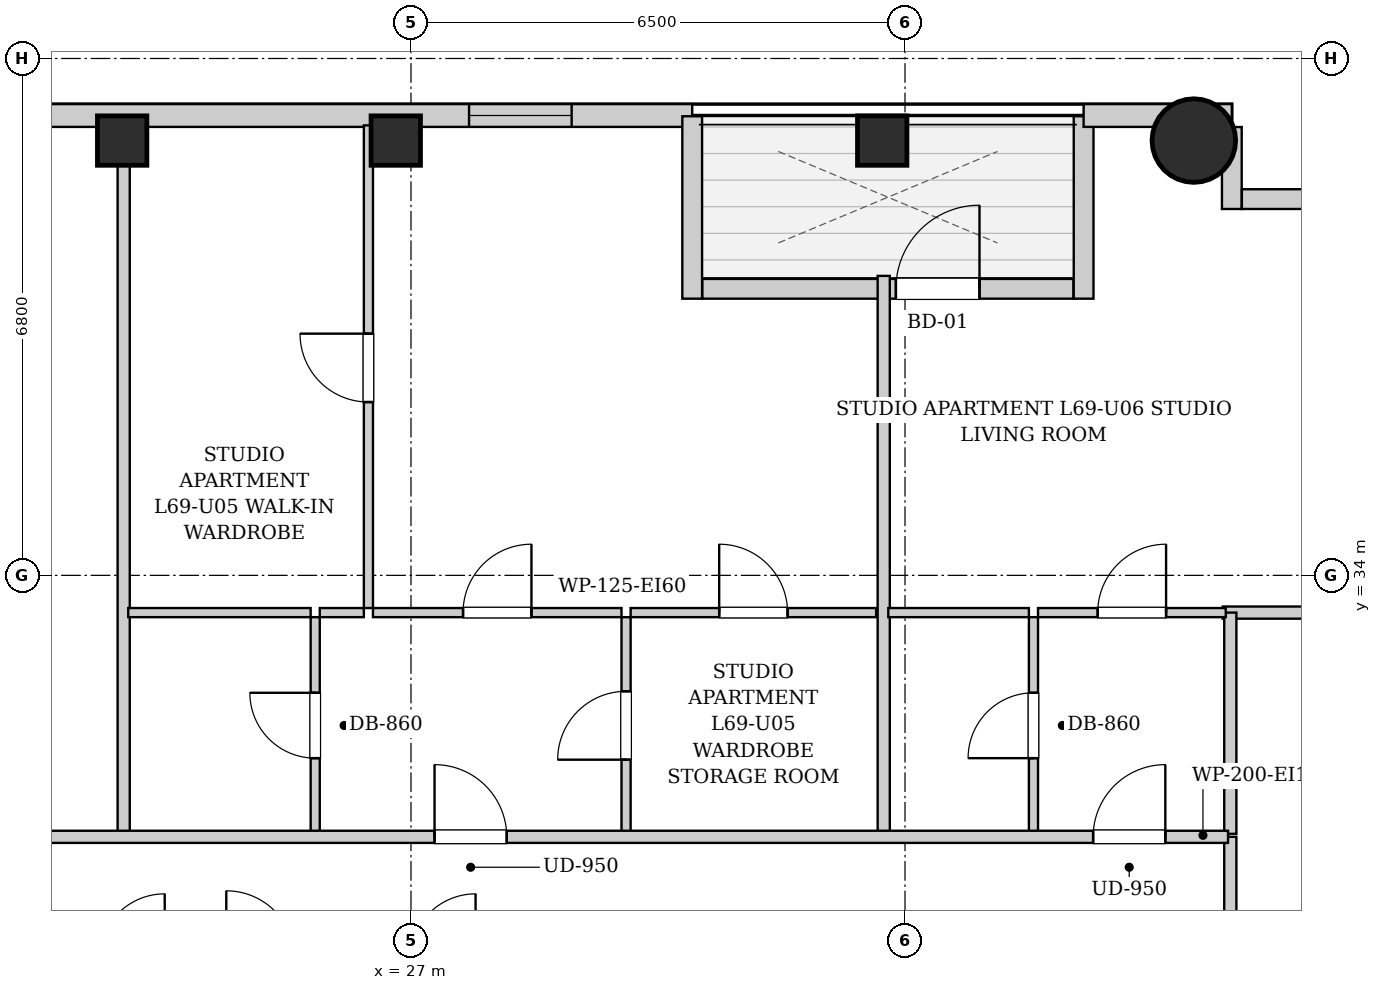
"""IFC4 building model, lengths in metres.
Left out: names, types, materials, properties, quantities, classifications, styles, units other than length and angle.
Written with IfcOpenShell. Run it as: python <this file> out.ifc"""

import sys

from ifc_helpers import new_model, si_unit, direction, frame, frame_2d, origin, origin_2d, place, context, subcontext, project, spatial, rectangle, circle, extrude, element, fill, save


model = new_model("IFC4")
c1 = context("Model", 3, precision=1e-05, world=origin(), true_north=direction((0.0, 1.0)))
c2 = subcontext(c1, "Body", "Model", "MODEL_VIEW")
j1 = project(units=[si_unit("LENGTHUNIT", "METRE"), si_unit("PLANEANGLEUNIT", "RADIAN")], contexts=[c1])
p1 = place(None, origin())
s1 = spatial("IfcSite", under=j1, at=p1, CompositionType="ELEMENT")
p2 = place(p1, origin())
s2 = spatial("IfcBuilding", under=s1, at=p2, CompositionType="ELEMENT")
p3 = place(p2, frame((0.0, 0.0, 237.7)))
s3 = spatial("IfcBuildingStorey", under=s2, at=p3, CompositionType="ELEMENT", Elevation=237.7)
for number, where, z_axis, x_axis in (
    (1, (23.2, 39.72, 0.0), (0.0, 0.0, 1.0), (1.0, 0.0, 0.0)),
    (2, (26.8, 39.72, 0.0), (0.0, 0.0, 1.0), (1.0, 0.0, 0.0)),
    (3, (33.2, 39.72, 0.0), (0.0, 0.0, 1.0), (1.0, 0.0, 0.0)),
):
    element("IfcColumn", number, at=place(p3, frame(where, z_axis=z_axis, x_axis=x_axis)), inside=s3, PredefinedType="COLUMN", context=c2, shape_type="SweptSolid", body=[
        extrude(rectangle(XDim=0.65, YDim=0.65, at=origin_2d()), origin(), (0.0, 0.0, 1.0), 3.4),
    ])
p4 = place(p3, frame((37.3, 39.72, 0.0), z_axis=(0.0, 0.0, 1.0), x_axis=(1.0, 0.0, 0.0)))
e4 = element("IfcColumn", 4, at=p4, inside=s3, PredefinedType="COLUMN", context=c2, shape_type="SweptSolid", body=[
    extrude(circle(Radius=0.55, at=origin_2d()), origin(), (0.0, 0.0, 1.0), 3.4),
])
p5 = place(p3, frame((19.7, 40.05, 0.0), z_axis=(0.0, 0.0, 1.0), x_axis=(1.0, 0.0, 0.0)))
e5 = element("IfcWall", 5, at=p5, inside=s3, PredefinedType="SOLIDWALL", context=c2, shape_type="SweptSolid", body=[
    extrude(rectangle(XDim=11.0, YDim=0.3, at=frame_2d((5.5, 0.0))), origin(), (0.0, 0.0, 1.0), 3.14),
])
p6 = place(p5, frame((8.064, 0.0, 0.55)))
e6 = element("IfcOpeningElement", 6, at=p6, cuts=e5, PredefinedType="OPENING", context=c2, shape_type="SweptSolid", body=[
    extrude(rectangle(XDim=1.35, YDim=1.2, at=frame_2d((0.675, 0.6))), frame((0.0, 0.16, 0.0), z_axis=(0.0, -1.0, 0.0), x_axis=(1.0, 0.0, 0.0)), (0.0, 0.0, 1.0), 0.32),
])
p7 = place(p3, frame((30.7, 40.04, 0.0), z_axis=(0.0, 0.0, 1.0), x_axis=(0.0, -1.0, 0.0)))
e7 = element("IfcWall", 7, at=p7, inside=s3, PredefinedType="SOLIDWALL", context=c2, shape_type="SweptSolid", body=[
    extrude(rectangle(XDim=2.4, YDim=0.26, at=frame_2d((1.2, 0.0))), origin(), (0.0, 0.0, 1.0), 3.14),
])
p8 = place(p3, frame((30.834, 37.77, 0.0), z_axis=(0.0, 0.0, 1.0), x_axis=(1.0, 0.0, 0.0)))
e8 = element("IfcWall", 8, at=p8, inside=s3, PredefinedType="SOLIDWALL", context=c2, shape_type="SweptSolid", body=[
    extrude(rectangle(XDim=4.882, YDim=0.26, at=frame_2d((2.441, 0.0))), origin(), (0.0, 0.0, 1.0), 3.14),
])
p9 = place(p8, frame((2.546, 0.0, 0.0)))
e9 = element("IfcOpeningElement", 9, at=p9, cuts=e8, PredefinedType="OPENING", context=c2, shape_type="SweptSolid", body=[
    extrude(rectangle(XDim=1.1, YDim=2.0, at=frame_2d((0.55, 1.0))), frame((0.0, 0.14, 0.0), z_axis=(0.0, -1.0, 0.0), x_axis=(1.0, 0.0, 0.0)), (0.0, 0.0, 1.0), 0.28),
])
p10 = place(p3, frame((35.85, 37.64, 0.0), z_axis=(0.0, 0.0, 1.0), x_axis=(0.0, 1.0, 0.0)))
e10 = element("IfcWall", 10, at=p10, inside=s3, PredefinedType="SOLIDWALL", context=c2, shape_type="SweptSolid", body=[
    extrude(rectangle(XDim=2.4, YDim=0.26, at=frame_2d((1.2, 0.0))), origin(), (0.0, 0.0, 1.0), 3.14),
])
p11 = place(p3, frame((35.85, 40.05, 0.0), z_axis=(0.0, 0.0, 1.0), x_axis=(1.0, 0.0, 0.0)))
e11 = element("IfcWall", 11, at=p11, inside=s3, PredefinedType="SOLIDWALL", context=c2, shape_type="SweptSolid", body=[
    extrude(rectangle(XDim=1.95, YDim=0.3, at=frame_2d((0.975, 0.0))), origin(), (0.0, 0.0, 1.0), 3.14),
])
p12 = place(p3, frame((37.8, 39.898, 0.0), z_axis=(0.0, 0.0, 1.0), x_axis=(0.0, -1.0, 0.0)))
e12 = element("IfcWall", 12, at=p12, inside=s3, PredefinedType="SOLIDWALL", context=c2, shape_type="SweptSolid", body=[
    extrude(rectangle(XDim=1.078, YDim=0.26, at=frame_2d((0.539, 0.0))), origin(), (0.0, 0.0, 1.0), 3.14),
])
p13 = place(p3, frame((37.932, 38.95, 0.0), z_axis=(0.0, 0.0, 1.0), x_axis=(1.0, 0.0, 0.0)))
e13 = element("IfcWall", 13, at=p13, inside=s3, PredefinedType="SOLIDWALL", context=c2, shape_type="SweptSolid", body=[
    extrude(rectangle(XDim=1.248, YDim=0.26, at=frame_2d((0.624, 0.0))), origin(), (0.0, 0.0, 1.0), 3.14),
])
p14 = place(p3, frame((37.78, 28.98, 0.0), z_axis=(0.0, 0.0, 1.0), x_axis=(0.0, 1.0, 0.0)))
e14 = element("IfcWall", 14, at=p14, inside=s3, PredefinedType="PARTITIONING", context=c2, shape_type="SweptSolid", body=[
    extrude(rectangle(XDim=1.58, YDim=0.16, at=frame_2d((0.79, 0.0))), origin(), (0.0, 0.0, 1.0), 3.14),
])
p15 = place(p3, frame((23.22, 30.6, 0.0), z_axis=(0.0, 0.0, 1.0), x_axis=(0.0, 1.0, 0.0)))
e15 = element("IfcWall", 15, at=p15, inside=s3, PredefinedType="PARTITIONING", context=c2, shape_type="SweptSolid", body=[
    extrude(rectangle(XDim=9.32, YDim=0.16, at=frame_2d((4.66, 0.0))), origin(), (0.0, 0.0, 1.0), 3.14),
])
p16 = place(p3, frame((25.74, 30.6, 0.0), z_axis=(0.0, 0.0, 1.0), x_axis=(0.0, 1.0, 0.0)))
e16 = element("IfcWall", 16, at=p16, inside=s3, PredefinedType="PARTITIONING", context=c2, shape_type="SweptSolid", body=[
    extrude(rectangle(XDim=2.85, YDim=0.12, at=frame_2d((1.425, 0.0))), origin(), (0.0, 0.0, 1.0), 3.14),
])
p17 = place(p16, frame((0.995, 0.0, 0.0)))
e17 = element("IfcOpeningElement", 17, at=p17, cuts=e16, PredefinedType="OPENING", context=c2, shape_type="SweptSolid", body=[
    extrude(rectangle(XDim=0.86, YDim=2.05, at=frame_2d((0.43, 1.025))), frame((0.0, 0.07, 0.0), z_axis=(0.0, -1.0, 0.0), x_axis=(1.0, 0.0, 0.0)), (0.0, 0.0, 1.0), 0.14),
])
p18 = place(p3, frame((23.28, 33.51, 0.0), z_axis=(0.0, 0.0, 1.0), x_axis=(1.0, 0.0, 0.0)))
e18 = element("IfcWall", 18, at=p18, inside=s3, PredefinedType="PARTITIONING", context=c2, shape_type="SweptSolid", body=[
    extrude(rectangle(XDim=2.4, YDim=0.12, at=frame_2d((1.2, 0.0))), origin(), (0.0, 0.0, 1.0), 3.14),
])
p19 = place(p3, frame((29.83, 30.6, 0.0), z_axis=(0.0, 0.0, 1.0), x_axis=(0.0, 1.0, 0.0)))
e19 = element("IfcWall", 19, at=p19, inside=s3, PredefinedType="PARTITIONING", context=c2, shape_type="SweptSolid", body=[
    extrude(rectangle(XDim=2.85, YDim=0.12, at=frame_2d((1.425, 0.0))), origin(), (0.0, 0.0, 1.0), 3.14),
])
p20 = place(p19, frame((0.975, 0.0, 0.0)))
e20 = element("IfcOpeningElement", 20, at=p20, cuts=e19, PredefinedType="OPENING", context=c2, shape_type="SweptSolid", body=[
    extrude(rectangle(XDim=0.9, YDim=2.05, at=frame_2d((0.45, 1.025))), frame((0.0, 0.07, 0.0), z_axis=(0.0, -1.0, 0.0), x_axis=(1.0, 0.0, 0.0)), (0.0, 0.0, 1.0), 0.14),
])
p21 = place(p3, frame((25.8, 33.51, 0.0), z_axis=(0.0, 0.0, 1.0), x_axis=(1.0, 0.0, 0.0)))
e21 = element("IfcWall", 21, at=p21, inside=s3, PredefinedType="PARTITIONING", context=c2, shape_type="SweptSolid", body=[
    extrude(rectangle(XDim=0.58, YDim=0.12, at=frame_2d((0.29, 0.0))), origin(), (0.0, 0.0, 1.0), 3.14),
])
p22 = place(p3, frame((26.5, 33.51, 0.0), z_axis=(0.0, 0.0, 1.0), x_axis=(1.0, 0.0, 0.0)))
e22 = element("IfcWall", 22, at=p22, inside=s3, PredefinedType="PARTITIONING", context=c2, shape_type="SweptSolid", body=[
    extrude(rectangle(XDim=3.27, YDim=0.12, at=frame_2d((1.635, 0.0))), origin(), (0.0, 0.0, 1.0), 3.14),
])
p23 = place(p22, frame((1.185, 0.0, 0.0)))
e23 = element("IfcOpeningElement", 23, at=p23, cuts=e22, PredefinedType="OPENING", context=c2, shape_type="SweptSolid", body=[
    extrude(rectangle(XDim=0.9, YDim=2.05, at=frame_2d((0.45, 1.025))), frame((0.0, 0.07, 0.0), z_axis=(0.0, -1.0, 0.0), x_axis=(1.0, 0.0, 0.0)), (0.0, 0.0, 1.0), 0.14),
])
p24 = place(p3, frame((29.89, 33.51, 0.0), z_axis=(0.0, 0.0, 1.0), x_axis=(1.0, 0.0, 0.0)))
e24 = element("IfcWall", 24, at=p24, inside=s3, PredefinedType="PARTITIONING", context=c2, shape_type="SweptSolid", body=[
    extrude(rectangle(XDim=3.23, YDim=0.12, at=frame_2d((1.615, 0.0))), origin(), (0.0, 0.0, 1.0), 3.14),
])
p25 = place(p24, frame((1.165, 0.0, 0.0)))
e25 = element("IfcOpeningElement", 25, at=p25, cuts=e24, PredefinedType="OPENING", context=c2, shape_type="SweptSolid", body=[
    extrude(rectangle(XDim=0.9, YDim=2.05, at=frame_2d((0.45, 1.025))), frame((0.0, 0.07, 0.0), z_axis=(0.0, -1.0, 0.0), x_axis=(1.0, 0.0, 0.0)), (0.0, 0.0, 1.0), 0.14),
])
p26 = place(p3, frame((26.44, 33.57, 0.0), z_axis=(0.0, 0.0, 1.0), x_axis=(0.0, 1.0, 0.0)))
e26 = element("IfcWall", 26, at=p26, inside=s3, PredefinedType="PARTITIONING", context=c2, shape_type="SweptSolid", body=[
    extrude(rectangle(XDim=6.35, YDim=0.12, at=frame_2d((3.175, 0.0))), origin(), (0.0, 0.0, 1.0), 3.14),
])
p27 = place(p26, frame((2.71, 0.0, 0.0)))
e27 = element("IfcOpeningElement", 27, at=p27, cuts=e26, PredefinedType="OPENING", context=c2, shape_type="SweptSolid", body=[
    extrude(rectangle(XDim=0.9, YDim=2.05, at=frame_2d((0.45, 1.025))), frame((0.0, 0.07, 0.0), z_axis=(0.0, -1.0, 0.0), x_axis=(1.0, 0.0, 0.0)), (0.0, 0.0, 1.0), 0.14),
])
p28 = place(p3, frame((37.68, 33.51, 0.0), z_axis=(0.0, 0.0, 1.0), x_axis=(1.0, 0.0, 0.0)))
e28 = element("IfcWall", 28, at=p28, inside=s3, PredefinedType="PARTITIONING", context=c2, shape_type="SweptSolid", body=[
    extrude(rectangle(XDim=2.34, YDim=0.16, at=frame_2d((1.17, 0.0))), origin(), (0.0, 0.0, 1.0), 3.14),
])
p29 = place(p3, frame((37.78, 30.6, 0.0), z_axis=(0.0, 0.0, 1.0), x_axis=(0.0, 1.0, 0.0)))
e29 = element("IfcWall", 29, at=p29, inside=s3, PredefinedType="PARTITIONING", context=c2, shape_type="SweptSolid", body=[
    extrude(rectangle(XDim=2.91, YDim=0.16, at=frame_2d((1.455, 0.0))), origin(), (0.0, 0.0, 1.0), 3.14),
])
p30 = place(p3, frame((33.22, 30.6, 0.0), z_axis=(0.0, 0.0, 1.0), x_axis=(0.0, 1.0, 0.0)))
e30 = element("IfcWall", 30, at=p30, inside=s3, PredefinedType="PARTITIONING", context=c2, shape_type="SweptSolid", body=[
    extrude(rectangle(XDim=7.34, YDim=0.16, at=frame_2d((3.67, 0.0))), origin(), (0.0, 0.0, 1.0), 2.668),
])
p31 = place(p3, frame((35.19, 30.6, 0.0), z_axis=(0.0, 0.0, 1.0), x_axis=(0.0, 1.0, 0.0)))
e31 = element("IfcWall", 31, at=p31, inside=s3, PredefinedType="PARTITIONING", context=c2, shape_type="SweptSolid", body=[
    extrude(rectangle(XDim=2.85, YDim=0.12, at=frame_2d((1.425, 0.0))), origin(), (0.0, 0.0, 1.0), 3.14),
])
p32 = place(p31, frame((0.995, 0.0, 0.0)))
e32 = element("IfcOpeningElement", 32, at=p32, cuts=e31, PredefinedType="OPENING", context=c2, shape_type="SweptSolid", body=[
    extrude(rectangle(XDim=0.86, YDim=2.05, at=frame_2d((0.43, 1.025))), frame((0.0, 0.07, 0.0), z_axis=(0.0, -1.0, 0.0), x_axis=(1.0, 0.0, 0.0)), (0.0, 0.0, 1.0), 0.14),
])
p33 = place(p3, frame((33.28, 33.51, 0.0), z_axis=(0.0, 0.0, 1.0), x_axis=(1.0, 0.0, 0.0)))
e33 = element("IfcWall", 33, at=p33, inside=s3, PredefinedType="PARTITIONING", context=c2, shape_type="SweptSolid", body=[
    extrude(rectangle(XDim=1.85, YDim=0.12, at=frame_2d((0.925, 0.0))), origin(), (0.0, 0.0, 1.0), 3.14),
])
p34 = place(p3, frame((35.25, 33.51, 0.0), z_axis=(0.0, 0.0, 1.0), x_axis=(1.0, 0.0, 0.0)))
e34 = element("IfcWall", 34, at=p34, inside=s3, PredefinedType="PARTITIONING", context=c2, shape_type="SweptSolid", body=[
    extrude(rectangle(XDim=2.47, YDim=0.12, at=frame_2d((1.235, 0.0))), origin(), (0.0, 0.0, 1.0), 3.14),
])
p35 = place(p34, frame((0.785, 0.0, 0.0)))
e35 = element("IfcOpeningElement", 35, at=p35, cuts=e34, PredefinedType="OPENING", context=c2, shape_type="SweptSolid", body=[
    extrude(rectangle(XDim=0.9, YDim=2.05, at=frame_2d((0.45, 1.025))), frame((0.0, 0.07, 0.0), z_axis=(0.0, -1.0, 0.0), x_axis=(1.0, 0.0, 0.0)), (0.0, 0.0, 1.0), 0.14),
])
p36 = place(p3, frame((13.15, 30.56, 0.0), z_axis=(0.0, 0.0, 1.0), x_axis=(1.0, 0.0, 0.0)))
e36 = element("IfcWall", 36, at=p36, inside=s3, PredefinedType="PARTITIONING", context=c2, shape_type="SweptSolid", body=[
    extrude(rectangle(XDim=24.6, YDim=0.16, at=frame_2d((12.3, 0.0))), origin(), (0.0, 0.0, 1.0), 3.14),
])
p37 = place(p36, frame((5.185, 0.0, 0.0)))
e37 = element("IfcOpeningElement", 37, at=p37, cuts=e36, PredefinedType="OPENING", context=c2, shape_type="SweptSolid", body=[
    extrude(rectangle(XDim=0.95, YDim=2.1, at=frame_2d((0.475, 1.05))), frame((0.0, 0.09, 0.0), z_axis=(0.0, -1.0, 0.0), x_axis=(1.0, 0.0, 0.0)), (0.0, 0.0, 1.0), 0.18),
])
p38 = place(p36, frame((14.16, 0.0, 0.0)))
e38 = element("IfcOpeningElement", 38, at=p38, cuts=e36, PredefinedType="OPENING", context=c2, shape_type="SweptSolid", body=[
    extrude(rectangle(XDim=0.95, YDim=2.1, at=frame_2d((0.475, 1.05))), frame((0.0, 0.09, 0.0), z_axis=(0.0, -1.0, 0.0), x_axis=(1.0, 0.0, 0.0)), (0.0, 0.0, 1.0), 0.18),
])
p39 = place(p36, frame((22.825, 0.0, 0.0)))
e39 = element("IfcOpeningElement", 39, at=p39, cuts=e36, PredefinedType="OPENING", context=c2, shape_type="SweptSolid", body=[
    extrude(rectangle(XDim=0.95, YDim=2.1, at=frame_2d((0.475, 1.05))), frame((0.0, 0.09, 0.0), z_axis=(0.0, -1.0, 0.0), x_axis=(1.0, 0.0, 0.0)), (0.0, 0.0, 1.0), 0.18),
])
p40 = place(p17, origin())
e40 = element("IfcDoor", 40, at=p40, inside=s3, OperationType="SINGLE_SWING_RIGHT", PredefinedType="DOOR", context=c2, shape_type="SweptSolid", body=[
    extrude(rectangle(XDim=0.86, YDim=2.05, at=frame_2d((0.43, 1.025))), frame((0.0, 0.025, 0.0), z_axis=(0.0, -1.0, 0.0), x_axis=(1.0, 0.0, 0.0)), (0.0, 0.0, 1.0), 0.05),
])
fill(e17, e40)
p41 = place(p20, origin())
e41 = element("IfcDoor", 41, at=p41, inside=s3, OperationType="SINGLE_SWING_LEFT", PredefinedType="DOOR", context=c2, shape_type="SweptSolid", body=[
    extrude(rectangle(XDim=0.9, YDim=2.05, at=frame_2d((0.45, 1.025))), frame((0.0, 0.025, 0.0), z_axis=(0.0, -1.0, 0.0), x_axis=(1.0, 0.0, 0.0)), (0.0, 0.0, 1.0), 0.05),
])
fill(e20, e41)
p42 = place(p23, origin())
e42 = element("IfcDoor", 42, at=p42, inside=s3, OperationType="SINGLE_SWING_RIGHT", PredefinedType="DOOR", context=c2, shape_type="SweptSolid", body=[
    extrude(rectangle(XDim=0.9, YDim=2.05, at=frame_2d((0.45, 1.025))), frame((0.0, 0.025, 0.0), z_axis=(0.0, -1.0, 0.0), x_axis=(1.0, 0.0, 0.0)), (0.0, 0.0, 1.0), 0.05),
])
fill(e23, e42)
p43 = place(p25, origin())
e43 = element("IfcDoor", 43, at=p43, inside=s3, OperationType="SINGLE_SWING_LEFT", PredefinedType="DOOR", context=c2, shape_type="SweptSolid", body=[
    extrude(rectangle(XDim=0.9, YDim=2.05, at=frame_2d((0.45, 1.025))), frame((0.0, 0.025, 0.0), z_axis=(0.0, -1.0, 0.0), x_axis=(1.0, 0.0, 0.0)), (0.0, 0.0, 1.0), 0.05),
])
fill(e25, e43)
p44 = place(p27, origin())
e44 = element("IfcDoor", 44, at=p44, inside=s3, OperationType="SINGLE_SWING_RIGHT", PredefinedType="DOOR", context=c2, shape_type="SweptSolid", body=[
    extrude(rectangle(XDim=0.9, YDim=2.05, at=frame_2d((0.45, 1.025))), frame((0.0, 0.025, 0.0), z_axis=(0.0, -1.0, 0.0), x_axis=(1.0, 0.0, 0.0)), (0.0, 0.0, 1.0), 0.05),
])
fill(e27, e44)
p45 = place(p32, origin())
e45 = element("IfcDoor", 45, at=p45, inside=s3, OperationType="SINGLE_SWING_LEFT", PredefinedType="DOOR", context=c2, shape_type="SweptSolid", body=[
    extrude(rectangle(XDim=0.86, YDim=2.05, at=frame_2d((0.43, 1.025))), frame((0.0, 0.025, 0.0), z_axis=(0.0, -1.0, 0.0), x_axis=(1.0, 0.0, 0.0)), (0.0, 0.0, 1.0), 0.05),
])
fill(e32, e45)
p46 = place(p35, origin())
e46 = element("IfcDoor", 46, at=p46, inside=s3, OperationType="SINGLE_SWING_RIGHT", PredefinedType="DOOR", context=c2, shape_type="SweptSolid", body=[
    extrude(rectangle(XDim=0.9, YDim=2.05, at=frame_2d((0.45, 1.025))), frame((0.0, 0.025, 0.0), z_axis=(0.0, -1.0, 0.0), x_axis=(1.0, 0.0, 0.0)), (0.0, 0.0, 1.0), 0.05),
])
fill(e35, e46)
p47 = place(p38, origin())
e47 = element("IfcDoor", 47, at=p47, inside=s3, OperationType="SINGLE_SWING_LEFT", PredefinedType="DOOR", context=c2, shape_type="SweptSolid", body=[
    extrude(rectangle(XDim=0.95, YDim=2.1, at=frame_2d((0.475, 1.05))), frame((0.0, 0.025, 0.0), z_axis=(0.0, -1.0, 0.0), x_axis=(1.0, 0.0, 0.0)), (0.0, 0.0, 1.0), 0.05),
])
fill(e38, e47)
p48 = place(p39, origin())
e48 = element("IfcDoor", 48, at=p48, inside=s3, OperationType="SINGLE_SWING_RIGHT", PredefinedType="DOOR", context=c2, shape_type="SweptSolid", body=[
    extrude(rectangle(XDim=0.95, YDim=2.1, at=frame_2d((0.475, 1.05))), frame((0.0, 0.025, 0.0), z_axis=(0.0, -1.0, 0.0), x_axis=(1.0, 0.0, 0.0)), (0.0, 0.0, 1.0), 0.05),
])
fill(e39, e48)
p49 = place(p9, origin())
e49 = element("IfcDoor", 49, at=p49, inside=s3, OperationType="SINGLE_SWING_RIGHT", PredefinedType="DOOR", context=c2, shape_type="SweptSolid", body=[
    extrude(rectangle(XDim=1.1, YDim=2.0, at=frame_2d((0.55, 1.0))), frame((0.0, 0.025, 0.0), z_axis=(0.0, -1.0, 0.0), x_axis=(1.0, 0.0, 0.0)), (0.0, 0.0, 1.0), 0.05),
])
fill(e9, e49)
p50 = place(p6, origin())
e50 = element("IfcWindow", 50, at=p50, inside=s3, PartitioningType="SINGLE_PANEL", PredefinedType="WINDOW", context=c2, shape_type="SweptSolid", body=[
    extrude(rectangle(XDim=1.35, YDim=1.2, at=frame_2d((0.675, 0.6))), frame((0.0, 0.03, 0.0), z_axis=(0.0, -1.0, 0.0), x_axis=(1.0, 0.0, 0.0)), (0.0, 0.0, 1.0), 0.06),
])
fill(e6, e50)
save(model, sys.argv[1])
